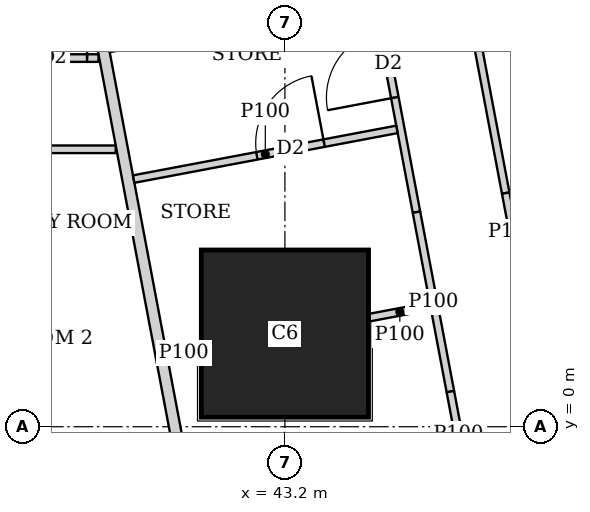
"""IFC4 building model, lengths in metres.
Left out: names, types, materials, properties, quantities, classifications, styles, units other than length and angle.
Written with IfcOpenShell. Run it as: python <this file> out.ifc"""

import sys

from ifc_helpers import new_model, si_unit, direction, frame, frame_2d, origin, origin_2d, place, context, subcontext, project, spatial, rectangle, extrude, element, fill, save


model = new_model("IFC4")
c1 = context("Model", 3, precision=1e-05, world=origin(), true_north=direction((0.0, 1.0)))
c2 = subcontext(c1, "Body", "Model", "MODEL_VIEW")
j1 = project(units=[si_unit("LENGTHUNIT", "METRE"), si_unit("PLANEANGLEUNIT", "RADIAN")], contexts=[c1])
p1 = place(None, origin())
s1 = spatial("IfcSite", under=j1, at=p1, CompositionType="ELEMENT")
p2 = place(p1, origin())
s2 = spatial("IfcBuilding", under=s1, at=p2, CompositionType="ELEMENT")
p3 = place(p2, frame((0.0, 0.0, 111.65)))
s3 = spatial("IfcBuildingStorey", under=s2, at=p3, CompositionType="ELEMENT", Elevation=111.65)
p4 = place(p3, frame((43.2, 1.225, 0.0), z_axis=(0.0, 0.0, 1.0), x_axis=(1.0, 0.0, 0.0)))
e1 = element("IfcColumn", 1, at=p4, inside=s3, PredefinedType="COLUMN", context=c2, shape_type="SweptSolid", body=[
    extrude(rectangle(XDim=2.2, YDim=2.2, at=origin_2d()), origin(), (0.0, 0.0, 1.0), 3.75),
])
p5 = place(p3, frame((50.653, 2.703, 0.0), z_axis=(0.0, 0.0, 1.0), x_axis=(-0.185612026696, 0.982623109613, 0.0)))
e2 = element("IfcWall", 2, at=p5, inside=s3, PredefinedType="SOLIDWALL", context=c2, shape_type="SweptSolid", body=[
    extrude(rectangle(XDim=41.393, YDim=0.2, at=frame_2d((20.697, 0.0))), origin(), (0.0, 0.0, 1.0), 3.5),
])
p6 = place(p5, frame((1.633, 0.0, 0.9)))
e3 = element("IfcOpeningElement", 3, at=p6, cuts=e2, PredefinedType="OPENING", context=c2, shape_type="SweptSolid", body=[
    extrude(rectangle(XDim=1.8, YDim=1.5, at=frame_2d((0.9, 0.75))), frame((0.0, 0.11, 0.0), z_axis=(0.0, -1.0, 0.0), x_axis=(1.0, 0.0, 0.0)), (0.0, 0.0, 1.0), 0.22),
])
p7 = place(p5, frame((6.032, 0.0, 0.9)))
e4 = element("IfcOpeningElement", 4, at=p7, cuts=e2, PredefinedType="OPENING", context=c2, shape_type="SweptSolid", body=[
    extrude(rectangle(XDim=1.8, YDim=1.5, at=frame_2d((0.9, 0.75))), frame((0.0, 0.11, 0.0), z_axis=(0.0, -1.0, 0.0), x_axis=(1.0, 0.0, 0.0)), (0.0, 0.0, 1.0), 0.22),
])
p8 = place(p5, frame((9.848, 0.0, 0.9)))
e5 = element("IfcOpeningElement", 5, at=p8, cuts=e2, PredefinedType="OPENING", context=c2, shape_type="SweptSolid", body=[
    extrude(rectangle(XDim=1.8, YDim=1.5, at=frame_2d((0.9, 0.75))), frame((0.0, 0.11, 0.0), z_axis=(0.0, -1.0, 0.0), x_axis=(1.0, 0.0, 0.0)), (0.0, 0.0, 1.0), 0.22),
])
p9 = place(p5, frame((13.664, 0.0, 0.9)))
e6 = element("IfcOpeningElement", 6, at=p9, cuts=e2, PredefinedType="OPENING", context=c2, shape_type="SweptSolid", body=[
    extrude(rectangle(XDim=1.8, YDim=1.5, at=frame_2d((0.9, 0.75))), frame((0.0, 0.11, 0.0), z_axis=(0.0, -1.0, 0.0), x_axis=(1.0, 0.0, 0.0)), (0.0, 0.0, 1.0), 0.22),
])
p10 = place(p5, frame((17.481, 0.0, 0.9)))
e7 = element("IfcOpeningElement", 7, at=p10, cuts=e2, PredefinedType="OPENING", context=c2, shape_type="SweptSolid", body=[
    extrude(rectangle(XDim=1.8, YDim=1.5, at=frame_2d((0.9, 0.75))), frame((0.0, 0.11, 0.0), z_axis=(0.0, -1.0, 0.0), x_axis=(1.0, 0.0, 0.0)), (0.0, 0.0, 1.0), 0.22),
])
p11 = place(p5, frame((21.297, 0.0, 0.9)))
e8 = element("IfcOpeningElement", 8, at=p11, cuts=e2, PredefinedType="OPENING", context=c2, shape_type="SweptSolid", body=[
    extrude(rectangle(XDim=1.8, YDim=1.5, at=frame_2d((0.9, 0.75))), frame((0.0, 0.11, 0.0), z_axis=(0.0, -1.0, 0.0), x_axis=(1.0, 0.0, 0.0)), (0.0, 0.0, 1.0), 0.22),
])
p12 = place(p5, frame((25.113, 0.0, 0.9)))
e9 = element("IfcOpeningElement", 9, at=p12, cuts=e2, PredefinedType="OPENING", context=c2, shape_type="SweptSolid", body=[
    extrude(rectangle(XDim=1.8, YDim=1.5, at=frame_2d((0.9, 0.75))), frame((0.0, 0.11, 0.0), z_axis=(0.0, -1.0, 0.0), x_axis=(1.0, 0.0, 0.0)), (0.0, 0.0, 1.0), 0.22),
])
p13 = place(p5, frame((28.93, 0.0, 0.9)))
e10 = element("IfcOpeningElement", 10, at=p13, cuts=e2, PredefinedType="OPENING", context=c2, shape_type="SweptSolid", body=[
    extrude(rectangle(XDim=1.8, YDim=1.5, at=frame_2d((0.9, 0.75))), frame((0.0, 0.11, 0.0), z_axis=(0.0, -1.0, 0.0), x_axis=(1.0, 0.0, 0.0)), (0.0, 0.0, 1.0), 0.22),
])
p14 = place(p5, frame((32.746, 0.0, 0.9)))
e11 = element("IfcOpeningElement", 11, at=p14, cuts=e2, PredefinedType="OPENING", context=c2, shape_type="SweptSolid", body=[
    extrude(rectangle(XDim=1.8, YDim=1.5, at=frame_2d((0.9, 0.75))), frame((0.0, 0.11, 0.0), z_axis=(0.0, -1.0, 0.0), x_axis=(1.0, 0.0, 0.0)), (0.0, 0.0, 1.0), 0.22),
])
p15 = place(p5, frame((36.481, 0.0, 0.9)))
e12 = element("IfcOpeningElement", 12, at=p15, cuts=e2, PredefinedType="OPENING", context=c2, shape_type="SweptSolid", body=[
    extrude(rectangle(XDim=1.8, YDim=1.5, at=frame_2d((0.9, 0.75))), frame((0.0, 0.11, 0.0), z_axis=(0.0, -1.0, 0.0), x_axis=(1.0, 0.0, 0.0)), (0.0, 0.0, 1.0), 0.22),
])
p16 = place(p3, frame((33.127, 45.65, 0.0), z_axis=(0.0, 0.0, 1.0), x_axis=(0.185598547723, -0.98262565562, 0.0)))
e13 = element("IfcWall", 13, at=p16, inside=s3, PredefinedType="SOLIDWALL", context=c2, shape_type="SweptSolid", body=[
    extrude(rectangle(XDim=47.118, YDim=0.15, at=frame_2d((23.559, 0.0))), origin(), (0.0, 0.0, 1.0), 2.2),
])
p17 = place(p16, frame((20.373, 0.0, 0.0)))
e14 = element("IfcOpeningElement", 14, at=p17, cuts=e13, PredefinedType="OPENING", context=c2, shape_type="SweptSolid", body=[
    extrude(rectangle(XDim=1.0, YDim=2.1, at=frame_2d((0.5, 1.05))), frame((0.0, 0.085, 0.0), z_axis=(0.0, -1.0, 0.0), x_axis=(1.0, 0.0, 0.0)), (0.0, 0.0, 1.0), 0.17),
])
p18 = place(p16, frame((24.188, 0.0, 0.0)))
e15 = element("IfcOpeningElement", 15, at=p18, cuts=e13, PredefinedType="OPENING", context=c2, shape_type="SweptSolid", body=[
    extrude(rectangle(XDim=1.0, YDim=2.1, at=frame_2d((0.5, 1.05))), frame((0.0, 0.085, 0.0), z_axis=(0.0, -1.0, 0.0), x_axis=(1.0, 0.0, 0.0)), (0.0, 0.0, 1.0), 0.17),
])
p19 = place(p16, frame((32.608, 0.0, 0.0)))
e16 = element("IfcOpeningElement", 16, at=p19, cuts=e13, PredefinedType="OPENING", context=c2, shape_type="SweptSolid", body=[
    extrude(rectangle(XDim=1.0, YDim=2.1, at=frame_2d((0.5, 1.05))), frame((0.0, 0.085, 0.0), z_axis=(0.0, -1.0, 0.0), x_axis=(1.0, 0.0, 0.0)), (0.0, 0.0, 1.0), 0.17),
])
p20 = place(p3, frame((40.974, 3.65, 0.0), z_axis=(0.0, 0.0, 1.0), x_axis=(-1.0, 0.0, 0.0)))
e17 = element("IfcWall", 17, at=p20, inside=s3, PredefinedType="PARTITIONING", context=c2, shape_type="SweptSolid", body=[
    extrude(rectangle(XDim=8.574, YDim=0.1, at=frame_2d((4.287, 0.0))), origin(), (0.0, 0.0, 1.0), 3.5),
])
p21 = place(p20, frame((6.275, 0.0, 0.0)))
e18 = element("IfcOpeningElement", 18, at=p21, cuts=e17, PredefinedType="OPENING", context=c2, shape_type="SweptSolid", body=[
    extrude(rectangle(XDim=0.9, YDim=2.1, at=frame_2d((0.45, 1.05))), frame((0.0, 0.06, 0.0), z_axis=(0.0, -1.0, 0.0), x_axis=(1.0, 0.0, 0.0)), (0.0, 0.0, 1.0), 0.12),
])
p22 = place(p20, frame((3.874, 0.0, 0.0)))
e19 = element("IfcOpeningElement", 19, at=p22, cuts=e17, PredefinedType="OPENING", context=c2, shape_type="SweptSolid", body=[
    extrude(rectangle(XDim=0.9, YDim=2.1, at=frame_2d((0.45, 1.05))), frame((0.0, 0.06, 0.0), z_axis=(0.0, -1.0, 0.0), x_axis=(1.0, 0.0, 0.0)), (0.0, 0.0, 1.0), 0.12),
])
p23 = place(p3, frame((40.747, 4.85, 0.0), z_axis=(0.0, 0.0, 1.0), x_axis=(-1.0, 0.0, 0.0)))
e20 = element("IfcWall", 20, at=p23, inside=s3, PredefinedType="PARTITIONING", context=c2, shape_type="SweptSolid", body=[
    extrude(rectangle(XDim=7.148, YDim=0.1, at=frame_2d((3.574, 0.0))), origin(), (0.0, 0.0, 1.0), 3.5),
])
p24 = place(p23, frame((5.498, 0.0, 0.0)))
e21 = element("IfcOpeningElement", 21, at=p24, cuts=e20, PredefinedType="OPENING", context=c2, shape_type="SweptSolid", body=[
    extrude(rectangle(XDim=0.9, YDim=2.1, at=frame_2d((0.45, 1.05))), frame((0.0, 0.06, 0.0), z_axis=(0.0, -1.0, 0.0), x_axis=(1.0, 0.0, 0.0)), (0.0, 0.0, 1.0), 0.12),
])
p25 = place(p23, frame((3.272, 0.0, 0.0)))
e22 = element("IfcOpeningElement", 22, at=p25, cuts=e20, PredefinedType="OPENING", context=c2, shape_type="SweptSolid", body=[
    extrude(rectangle(XDim=0.9, YDim=2.1, at=frame_2d((0.45, 1.05))), frame((0.0, 0.06, 0.0), z_axis=(0.0, -1.0, 0.0), x_axis=(1.0, 0.0, 0.0)), (0.0, 0.0, 1.0), 0.12),
])
p26 = place(p23, frame((0.15, 0.0, 0.0)))
e23 = element("IfcOpeningElement", 23, at=p26, cuts=e20, PredefinedType="OPENING", context=c2, shape_type="SweptSolid", body=[
    extrude(rectangle(XDim=0.9, YDim=2.1, at=frame_2d((0.45, 1.05))), frame((0.0, 0.06, 0.0), z_axis=(0.0, -1.0, 0.0), x_axis=(1.0, 0.0, 0.0)), (0.0, 0.0, 1.0), 0.12),
])
p27 = place(p23, frame((1.472, 0.0, 0.0)))
e24 = element("IfcOpeningElement", 24, at=p27, cuts=e20, PredefinedType="OPENING", context=c2, shape_type="SweptSolid", body=[
    extrude(rectangle(XDim=0.9, YDim=2.1, at=frame_2d((0.45, 1.05))), frame((0.0, 0.06, 0.0), z_axis=(0.0, -1.0, 0.0), x_axis=(1.0, 0.0, 0.0)), (0.0, 0.0, 1.0), 0.12),
])
p28 = place(p3, frame((44.08, 13.794, 0.0), z_axis=(0.0, 0.0, 1.0), x_axis=(0.185608455357, -0.982623784212, 0.0)))
e25 = element("IfcWall", 25, at=p28, inside=s3, PredefinedType="PARTITIONING", context=c2, shape_type="SweptSolid", body=[
    extrude(rectangle(XDim=10.909, YDim=0.1, at=frame_2d((5.455, 0.0))), origin(), (0.0, 0.0, 1.0), 3.5),
])
p29 = place(p28, frame((1.094, 0.0, 0.0)))
e26 = element("IfcOpeningElement", 26, at=p29, cuts=e25, PredefinedType="OPENING", context=c2, shape_type="SweptSolid", body=[
    extrude(rectangle(XDim=0.9, YDim=2.1, at=frame_2d((0.45, 1.05))), frame((0.0, 0.06, 0.0), z_axis=(0.0, -1.0, 0.0), x_axis=(1.0, 0.0, 0.0)), (0.0, 0.0, 1.0), 0.12),
])
p30 = place(p28, frame((3.639, 0.0, 0.0)))
e27 = element("IfcOpeningElement", 27, at=p30, cuts=e25, PredefinedType="OPENING", context=c2, shape_type="SweptSolid", body=[
    extrude(rectangle(XDim=0.9, YDim=2.1, at=frame_2d((0.45, 1.05))), frame((0.0, 0.06, 0.0), z_axis=(0.0, -1.0, 0.0), x_axis=(1.0, 0.0, 0.0)), (0.0, 0.0, 1.0), 0.12),
])
p31 = place(p28, frame((8.05, 0.0, 0.0)))
e28 = element("IfcOpeningElement", 28, at=p31, cuts=e25, PredefinedType="OPENING", context=c2, shape_type="SweptSolid", body=[
    extrude(rectangle(XDim=0.9, YDim=2.1, at=frame_2d((0.45, 1.05))), frame((0.0, 0.06, 0.0), z_axis=(0.0, -1.0, 0.0), x_axis=(1.0, 0.0, 0.0)), (0.0, 0.0, 1.0), 0.12),
])
p32 = place(p3, frame((46.105, 3.074, 0.0), z_axis=(0.0, 0.0, 1.0), x_axis=(0.185727077805, -0.982601370124, 0.0)))
e29 = element("IfcWall", 29, at=p32, inside=s3, PredefinedType="PARTITIONING", context=c2, shape_type="SweptSolid", body=[
    extrude(rectangle(XDim=1.045, YDim=0.1, at=frame_2d((0.522, 0.0))), origin(), (0.0, 0.0, 1.0), 2.05),
])
p33 = place(p3, frame((44.049, 7.491, 0.0), z_axis=(0.0, 0.0, 1.0), x_axis=(0.185628828844, -0.982619935632, 0.0)))
e30 = element("IfcWall", 30, at=p33, inside=s3, PredefinedType="PARTITIONING", context=c2, shape_type="SweptSolid", body=[
    extrude(rectangle(XDim=4.75, YDim=0.1, at=frame_2d((2.375, 0.0))), origin(), (0.0, 0.0, 1.0), 3.5),
])
p34 = place(p33, frame((0.8, 0.0, 0.0)))
e31 = element("IfcOpeningElement", 31, at=p34, cuts=e30, PredefinedType="OPENING", context=c2, shape_type="SweptSolid", body=[
    extrude(rectangle(XDim=0.9, YDim=2.1, at=frame_2d((0.45, 1.05))), frame((0.0, 0.06, 0.0), z_axis=(0.0, -1.0, 0.0), x_axis=(1.0, 0.0, 0.0)), (0.0, 0.0, 1.0), 0.12),
])
p35 = place(p33, frame((2.316, 0.0, 0.0)))
e32 = element("IfcOpeningElement", 32, at=p35, cuts=e30, PredefinedType="OPENING", context=c2, shape_type="SweptSolid", body=[
    extrude(rectangle(XDim=0.9, YDim=2.1, at=frame_2d((0.45, 1.05))), frame((0.0, 0.06, 0.0), z_axis=(0.0, -1.0, 0.0), x_axis=(1.0, 0.0, 0.0)), (0.0, 0.0, 1.0), 0.12),
])
p36 = place(p3, frame((44.931, 2.823, 0.0), z_axis=(0.0, 0.0, 1.0), x_axis=(0.185631845838, -0.982619365681, 0.0)))
e33 = element("IfcWall", 33, at=p36, inside=s3, PredefinedType="PARTITIONING", context=c2, shape_type="SweptSolid", body=[
    extrude(rectangle(XDim=2.403, YDim=0.1, at=frame_2d((1.201, 0.0))), origin(), (0.0, 0.0, 1.0), 2.05),
])
p37 = place(p3, frame((45.377, 0.462, 0.0), z_axis=(0.0, 0.0, 1.0), x_axis=(0.185565106588, -0.9826319714, 0.0)))
e34 = element("IfcWall", 34, at=p37, inside=s3, PredefinedType="PARTITIONING", context=c2, shape_type="SweptSolid", body=[
    extrude(rectangle(XDim=1.131, YDim=0.1, at=frame_2d((0.566, 0.0))), origin(), (0.0, 0.0, 1.0), 3.5),
])
p38 = place(p3, frame((45.114, 1.587, 0.0), z_axis=(0.0, 0.0, 1.0), x_axis=(-0.982624706348, -0.185603573443, 0.0)))
e35 = element("IfcWall", 35, at=p38, inside=s3, PredefinedType="PARTITIONING", context=c2, shape_type="SweptSolid", body=[
    extrude(rectangle(XDim=0.818, YDim=0.1, at=frame_2d((0.409, 0.0))), origin(), (0.0, 0.0, 1.0), 2.05),
])
p39 = place(p3, frame((42.09, 1.015, 0.0), z_axis=(0.0, 0.0, 1.0), x_axis=(-0.982680384557, -0.185308558375, 0.0)))
e36 = element("IfcWall", 36, at=p39, inside=s3, PredefinedType="PARTITIONING", context=c2, shape_type="SweptSolid", body=[
    extrude(rectangle(XDim=0.448, YDim=0.1, at=frame_2d((0.224, 0.0))), origin(), (0.0, 0.0, 1.0), 2.05),
])
p40 = place(p3, frame((41.21, 3.258, 0.0), z_axis=(0.0, 0.0, 1.0), x_axis=(0.982638553676, 0.185530247748, 0.0)))
e37 = element("IfcWall", 37, at=p40, inside=s3, PredefinedType="PARTITIONING", context=c2, shape_type="SweptSolid", body=[
    extrude(rectangle(XDim=3.525, YDim=0.1, at=frame_2d((1.763, 0.0))), origin(), (0.0, 0.0, 1.0), 3.5),
])
p41 = place(p40, frame((1.65, 0.0, 0.0)))
e38 = element("IfcOpeningElement", 38, at=p41, cuts=e37, PredefinedType="OPENING", context=c2, shape_type="SweptSolid", body=[
    extrude(rectangle(XDim=0.9, YDim=2.1, at=frame_2d((0.45, 1.05))), frame((0.0, 0.06, 0.0), z_axis=(0.0, -1.0, 0.0), x_axis=(1.0, 0.0, 0.0)), (0.0, 0.0, 1.0), 0.12),
])
p42 = place(p26, origin())
e39 = element("IfcDoor", 39, at=p42, inside=s3, OperationType="SINGLE_SWING_RIGHT", PredefinedType="DOOR", context=c2, shape_type="SweptSolid", body=[
    extrude(rectangle(XDim=0.9, YDim=2.1, at=frame_2d((0.45, 1.05))), frame((0.0, 0.025, 0.0), z_axis=(0.0, -1.0, 0.0), x_axis=(1.0, 0.0, 0.0)), (0.0, 0.0, 1.0), 0.05),
])
fill(e23, e39)
p43 = place(p35, origin())
e40 = element("IfcDoor", 40, at=p43, inside=s3, OperationType="SINGLE_SWING_LEFT", PredefinedType="DOOR", context=c2, shape_type="SweptSolid", body=[
    extrude(rectangle(XDim=0.9, YDim=2.1, at=frame_2d((0.45, 1.05))), frame((0.0, 0.025, 0.0), z_axis=(0.0, -1.0, 0.0), x_axis=(1.0, 0.0, 0.0)), (0.0, 0.0, 1.0), 0.05),
])
fill(e32, e40)
p44 = place(p41, origin())
e41 = element("IfcDoor", 41, at=p44, inside=s3, OperationType="SINGLE_SWING_RIGHT", PredefinedType="DOOR", context=c2, shape_type="SweptSolid", body=[
    extrude(rectangle(XDim=0.9, YDim=2.1, at=frame_2d((0.45, 1.05))), frame((0.0, 0.025, 0.0), z_axis=(0.0, -1.0, 0.0), x_axis=(1.0, 0.0, 0.0)), (0.0, 0.0, 1.0), 0.05),
])
fill(e38, e41)
save(model, sys.argv[1])
